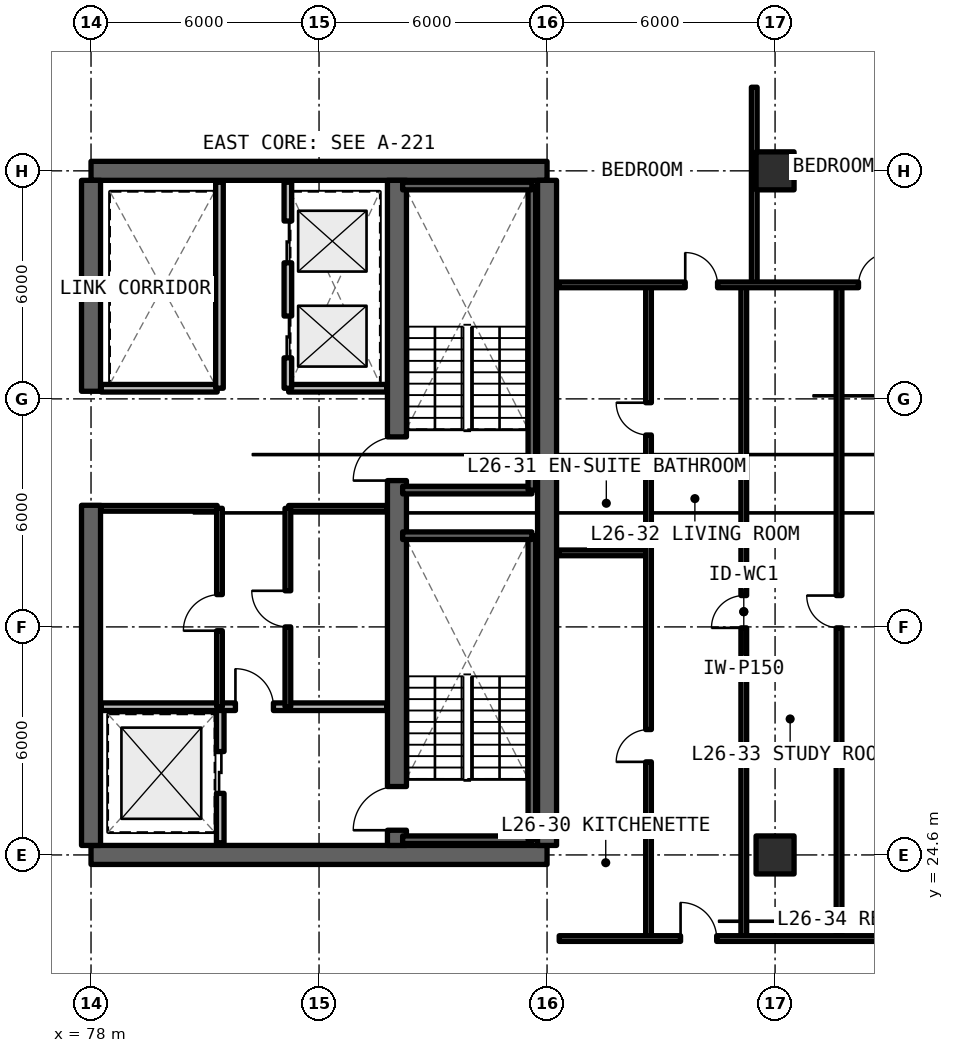
"""IFC4 building model, lengths in metres.
Left out: names, types, materials, properties, quantities, classifications, styles, units other than length and angle.
Written with IfcOpenShell. Run it as: python <this file> out.ifc"""

import sys

from ifc_helpers import new_model, si_unit, direction, frame, frame_2d, origin, origin_2d, place, context, subcontext, project, spatial, rectangle, extrude, element, fill, save


model = new_model("IFC4")
c1 = context("Model", 3, precision=1e-05, world=origin(), true_north=direction((0.0, 1.0)))
c2 = subcontext(c1, "Body", "Model", "MODEL_VIEW")
j1 = project(units=[si_unit("LENGTHUNIT", "METRE"), si_unit("PLANEANGLEUNIT", "RADIAN")], contexts=[c1])
p1 = place(None, origin())
s1 = spatial("IfcSite", under=j1, at=p1, CompositionType="ELEMENT")
p2 = place(p1, origin())
s2 = spatial("IfcBuilding", under=s1, at=p2, CompositionType="ELEMENT")
p3 = place(p2, frame((0.0, 0.0, 95.37)))
s3 = spatial("IfcBuildingStorey", under=s2, at=p3, CompositionType="ELEMENT", Elevation=95.37)
for number, where, z_axis, x_axis in (
    (1, (78.0, 24.6, 0.0), (0.0, 0.0, 1.0), (1.0, 0.0, 0.0)),
    (2, (90.0, 42.6, 0.0), (0.0, 0.0, 1.0), (-1.0, 0.0, 0.0)),
):
    element("IfcWall", number, at=place(p3, frame(where, z_axis=z_axis, x_axis=x_axis)), inside=s3, PredefinedType="SHEAR", context=c2, shape_type="SweptSolid", body=[
        extrude(rectangle(XDim=12.0, YDim=0.5, at=frame_2d((6.0, 0.0))), origin(), (0.0, 0.0, 1.0), 3.3),
    ])
p4 = place(p3, frame((90.0, 24.85, 0.0), z_axis=(0.0, 0.0, 1.0), x_axis=(0.0, 1.0, 0.0)))
e3 = element("IfcWall", 3, at=p4, inside=s3, PredefinedType="SHEAR", context=c2, shape_type="SweptSolid", body=[
    extrude(rectangle(XDim=17.5, YDim=0.5, at=frame_2d((8.75, 0.0))), origin(), (0.0, 0.0, 1.0), 3.3),
])
p5 = place(p3, frame((78.0, 24.85, 0.0), z_axis=(0.0, 0.0, 1.0), x_axis=(0.0, 1.0, 0.0)))
e4 = element("IfcWall", 4, at=p5, inside=s3, PredefinedType="SHEAR", context=c2, shape_type="SweptSolid", body=[
    extrude(rectangle(XDim=8.95, YDim=0.5, at=frame_2d((4.475, 0.0))), origin(), (0.0, 0.0, 1.0), 3.3),
])
p6 = place(p3, frame((78.0, 36.8, 0.0), z_axis=(0.0, 0.0, 1.0), x_axis=(0.0, 1.0, 0.0)))
e5 = element("IfcWall", 5, at=p6, inside=s3, PredefinedType="SHEAR", context=c2, shape_type="SweptSolid", body=[
    extrude(rectangle(XDim=5.55, YDim=0.5, at=frame_2d((2.775, 0.0))), origin(), (0.0, 0.0, 1.0), 3.3),
])
p7 = place(p3, frame((86.05, 24.85, 0.0), z_axis=(0.0, 0.0, 1.0), x_axis=(0.0, 1.0, 0.0)))
e6 = element("IfcWall", 6, at=p7, inside=s3, PredefinedType="SHEAR", context=c2, shape_type="SweptSolid", body=[
    extrude(rectangle(XDim=17.5, YDim=0.5, at=frame_2d((8.75, 0.0))), origin(), (0.0, 0.0, 1.0), 3.3),
])
p8 = place(p7, frame((0.4, 0.0, 0.0)))
e7 = element("IfcOpeningElement", 7, at=p8, cuts=e6, PredefinedType="OPENING", context=c2, shape_type="SweptSolid", body=[
    extrude(rectangle(XDim=1.15, YDim=2.15, at=frame_2d((0.575, 1.075))), frame((0.0, 0.26, 0.0), z_axis=(0.0, -1.0, 0.0), x_axis=(1.0, 0.0, 0.0)), (0.0, 0.0, 1.0), 0.52),
])
p9 = place(p7, frame((9.6, 0.0, 0.0)))
e8 = element("IfcOpeningElement", 8, at=p9, cuts=e6, PredefinedType="OPENING", context=c2, shape_type="SweptSolid", body=[
    extrude(rectangle(XDim=1.15, YDim=2.15, at=frame_2d((0.575, 1.075))), frame((0.0, 0.26, 0.0), z_axis=(0.0, -1.0, 0.0), x_axis=(1.0, 0.0, 0.0)), (0.0, 0.0, 1.0), 0.52),
])
for number, where, z_axis, x_axis in (
    (9, (96.0, 24.6, 0.0), (0.0, 0.0, 1.0), (1.0, 0.0, 0.0)),
    (10, (96.0, 42.6, 0.0), (0.0, 0.0, 1.0), (1.0, 0.0, 0.0)),
):
    element("IfcColumn", number, at=place(p3, frame(where, z_axis=z_axis, x_axis=x_axis)), inside=s3, PredefinedType="COLUMN", context=c2, shape_type="SweptSolid", body=[
        extrude(rectangle(XDim=1.0, YDim=1.0, at=origin_2d()), origin(), (0.0, 0.0, 1.0), 3.3),
    ])
p10 = place(p3, frame((81.4, 24.92, 0.0), z_axis=(0.0, 0.0, 1.0), x_axis=(0.0, 1.0, 0.0)))
e11 = element("IfcWall", 11, at=p10, inside=s3, PredefinedType="SOLIDWALL", context=c2, shape_type="SweptSolid", body=[
    extrude(rectangle(XDim=3.58, YDim=0.2, at=frame_2d((1.79, 0.0))), origin(), (0.0, 0.0, 1.0), 2.35),
])
p11 = place(p10, frame((1.3, 0.0, 0.0)))
e12 = element("IfcOpeningElement", 12, at=p11, cuts=e11, PredefinedType="OPENING", context=c2, shape_type="SweptSolid", body=[
    extrude(rectangle(XDim=1.1, YDim=2.2, at=frame_2d((0.55, 1.1))), frame((0.0, 0.11, 0.0), z_axis=(0.0, -1.0, 0.0), x_axis=(1.0, 0.0, 0.0)), (0.0, 0.0, 1.0), 0.22),
])
p12 = place(p3, frame((78.27, 28.5, 0.0), z_axis=(0.0, 0.0, 1.0), x_axis=(1.0, 0.0, 0.0)))
e13 = element("IfcWall", 13, at=p12, inside=s3, PredefinedType="SOLIDWALL", context=c2, shape_type="SweptSolid", body=[
    extrude(rectangle(XDim=7.51, YDim=0.2, at=frame_2d((3.755, 0.0))), origin(), (0.0, 0.0, 1.0), 2.35),
])
p13 = place(p12, frame((3.53, 0.0, 0.0)))
e14 = element("IfcOpeningElement", 14, at=p13, cuts=e13, PredefinedType="OPENING", context=c2, shape_type="SweptSolid", body=[
    extrude(rectangle(XDim=1.0, YDim=2.15, at=frame_2d((0.5, 1.075))), frame((0.0, 0.11, 0.0), z_axis=(0.0, -1.0, 0.0), x_axis=(1.0, 0.0, 0.0)), (0.0, 0.0, 1.0), 0.22),
])
p14 = place(p3, frame((83.2, 33.72, 0.0), z_axis=(0.0, 0.0, 1.0), x_axis=(1.0, 0.0, 0.0)))
e15 = element("IfcWall", 15, at=p14, inside=s3, PredefinedType="SOLIDWALL", context=c2, shape_type="SweptSolid", body=[
    extrude(rectangle(XDim=2.58, YDim=0.15, at=frame_2d((1.29, 0.0))), origin(), (0.0, 0.0, 1.0), 2.35),
])
p15 = place(p3, frame((83.18, 28.5, 0.0), z_axis=(0.0, 0.0, 1.0), x_axis=(0.0, 1.0, 0.0)))
e16 = element("IfcWall", 16, at=p15, inside=s3, PredefinedType="SOLIDWALL", context=c2, shape_type="SweptSolid", body=[
    extrude(rectangle(XDim=5.22, YDim=0.15, at=frame_2d((2.61, 0.0))), origin(), (0.0, 0.0, 1.0), 2.35),
])
p16 = place(p15, frame((2.1, 0.0, 0.0)))
e17 = element("IfcOpeningElement", 17, at=p16, cuts=e16, PredefinedType="OPENING", context=c2, shape_type="SweptSolid", body=[
    extrude(rectangle(XDim=0.95, YDim=2.15, at=frame_2d((0.475, 1.075))), frame((0.0, 0.085, 0.0), z_axis=(0.0, -1.0, 0.0), x_axis=(1.0, 0.0, 0.0)), (0.0, 0.0, 1.0), 0.17),
])
p17 = place(p3, frame((78.27, 33.72, 0.0), z_axis=(0.0, 0.0, 1.0), x_axis=(1.0, 0.0, 0.0)))
e18 = element("IfcWall", 18, at=p17, inside=s3, PredefinedType="SOLIDWALL", context=c2, shape_type="SweptSolid", body=[
    extrude(rectangle(XDim=3.05, YDim=0.15, at=frame_2d((1.525, 0.0))), origin(), (0.0, 0.0, 1.0), 2.35),
])
p18 = place(p3, frame((81.38, 28.5, 0.0), z_axis=(0.0, 0.0, 1.0), x_axis=(0.0, 1.0, 0.0)))
e19 = element("IfcWall", 19, at=p18, inside=s3, PredefinedType="SOLIDWALL", context=c2, shape_type="SweptSolid", body=[
    extrude(rectangle(XDim=5.22, YDim=0.15, at=frame_2d((2.61, 0.0))), origin(), (0.0, 0.0, 1.0), 2.35),
])
p19 = place(p18, frame((2.0, 0.0, 0.0)))
e20 = element("IfcOpeningElement", 20, at=p19, cuts=e19, PredefinedType="OPENING", context=c2, shape_type="SweptSolid", body=[
    extrude(rectangle(XDim=0.95, YDim=2.15, at=frame_2d((0.475, 1.075))), frame((0.0, 0.085, 0.0), z_axis=(0.0, -1.0, 0.0), x_axis=(1.0, 0.0, 0.0)), (0.0, 0.0, 1.0), 0.17),
])
p20 = place(p3, frame((83.2, 36.88, 0.0), z_axis=(0.0, 0.0, 1.0), x_axis=(1.0, 0.0, 0.0)))
e21 = element("IfcWall", 21, at=p20, inside=s3, PredefinedType="SOLIDWALL", context=c2, shape_type="SweptSolid", body=[
    extrude(rectangle(XDim=2.58, YDim=0.2, at=frame_2d((1.29, 0.0))), origin(), (0.0, 0.0, 1.0), 2.35),
])
p21 = place(p3, frame((83.18, 36.88, 0.0), z_axis=(0.0, 0.0, 1.0), x_axis=(0.0, 1.0, 0.0)))
e22 = element("IfcWall", 22, at=p21, inside=s3, PredefinedType="SOLIDWALL", context=c2, shape_type="SweptSolid", body=[
    extrude(rectangle(XDim=5.42, YDim=0.2, at=frame_2d((2.71, 0.0))), origin(), (0.0, 0.0, 1.0), 2.35),
])
p22 = place(p21, frame((0.8, 0.0, 0.0)))
e23 = element("IfcOpeningElement", 23, at=p22, cuts=e22, PredefinedType="OPENING", context=c2, shape_type="SweptSolid", body=[
    extrude(rectangle(XDim=1.1, YDim=2.2, at=frame_2d((0.55, 1.1))), frame((0.0, 0.11, 0.0), z_axis=(0.0, -1.0, 0.0), x_axis=(1.0, 0.0, 0.0)), (0.0, 0.0, 1.0), 0.22),
])
p23 = place(p21, frame((3.3, 0.0, 0.0)))
e24 = element("IfcOpeningElement", 24, at=p23, cuts=e22, PredefinedType="OPENING", context=c2, shape_type="SweptSolid", body=[
    extrude(rectangle(XDim=1.1, YDim=2.2, at=frame_2d((0.55, 1.1))), frame((0.0, 0.11, 0.0), z_axis=(0.0, -1.0, 0.0), x_axis=(1.0, 0.0, 0.0)), (0.0, 0.0, 1.0), 0.22),
])
p24 = place(p3, frame((78.27, 36.88, 0.0), z_axis=(0.0, 0.0, 1.0), x_axis=(1.0, 0.0, 0.0)))
e25 = element("IfcWall", 25, at=p24, inside=s3, PredefinedType="SOLIDWALL", context=c2, shape_type="SweptSolid", body=[
    extrude(rectangle(XDim=3.05, YDim=0.2, at=frame_2d((1.525, 0.0))), origin(), (0.0, 0.0, 1.0), 2.35),
])
p25 = place(p3, frame((81.38, 36.88, 0.0), z_axis=(0.0, 0.0, 1.0), x_axis=(0.0, 1.0, 0.0)))
e26 = element("IfcWall", 26, at=p25, inside=s3, PredefinedType="SOLIDWALL", context=c2, shape_type="SweptSolid", body=[
    extrude(rectangle(XDim=5.42, YDim=0.2, at=frame_2d((2.71, 0.0))), origin(), (0.0, 0.0, 1.0), 2.35),
])
p26 = place(p3, frame((95.177, 22.4, 0.0), z_axis=(0.0, 0.0, 1.0), x_axis=(0.0, 1.0, 0.0)))
e27 = element("IfcWall", 27, at=p26, inside=s3, PredefinedType="PARTITIONING", context=c2, shape_type="SweptSolid", body=[
    extrude(rectangle(XDim=17.2, YDim=0.15, at=frame_2d((8.6, 0.0))), origin(), (0.0, 0.0, 1.0), 2.35),
])
p27 = place(p26, frame((8.175, 0.0, 0.0)))
e28 = element("IfcOpeningElement", 28, at=p27, cuts=e27, PredefinedType="OPENING", context=c2, shape_type="SweptSolid", body=[
    extrude(rectangle(XDim=0.85, YDim=2.1, at=frame_2d((0.425, 1.05))), frame((0.0, 0.085, 0.0), z_axis=(0.0, -1.0, 0.0), x_axis=(1.0, 0.0, 0.0)), (0.0, 0.0, 1.0), 0.17),
])
p28 = place(p3, frame((97.683, 22.4, 0.0), z_axis=(0.0, 0.0, 1.0), x_axis=(0.0, 1.0, 0.0)))
e29 = element("IfcWall", 29, at=p28, inside=s3, PredefinedType="PARTITIONING", context=c2, shape_type="SweptSolid", body=[
    extrude(rectangle(XDim=17.2, YDim=0.15, at=frame_2d((8.6, 0.0))), origin(), (0.0, 0.0, 1.0), 2.35),
])
p29 = place(p28, frame((8.175, 0.0, 0.0)))
e30 = element("IfcOpeningElement", 30, at=p29, cuts=e29, PredefinedType="OPENING", context=c2, shape_type="SweptSolid", body=[
    extrude(rectangle(XDim=0.85, YDim=2.1, at=frame_2d((0.425, 1.05))), frame((0.0, 0.085, 0.0), z_axis=(0.0, -1.0, 0.0), x_axis=(1.0, 0.0, 0.0)), (0.0, 0.0, 1.0), 0.17),
])
p30 = place(p3, frame((90.32, 32.548, 0.0), z_axis=(0.0, 0.0, 1.0), x_axis=(1.0, 0.0, 0.0)))
e31 = element("IfcWall", 31, at=p30, inside=s3, PredefinedType="PARTITIONING", context=c2, shape_type="SweptSolid", body=[
    extrude(rectangle(XDim=2.35, YDim=0.15, at=frame_2d((1.175, 0.0))), origin(), (0.0, 0.0, 1.0), 2.35),
])
p31 = place(p3, frame((92.67, 22.4, 0.0), z_axis=(0.0, 0.0, 1.0), x_axis=(0.0, 1.0, 0.0)))
e32 = element("IfcWall", 32, at=p31, inside=s3, PredefinedType="PARTITIONING", context=c2, shape_type="SweptSolid", body=[
    extrude(rectangle(XDim=17.2, YDim=0.15, at=frame_2d((8.6, 0.0))), origin(), (0.0, 0.0, 1.0), 2.35),
])
p32 = place(p31, frame((4.649, 0.0, 0.0)))
e33 = element("IfcOpeningElement", 33, at=p32, cuts=e32, PredefinedType="OPENING", context=c2, shape_type="SweptSolid", body=[
    extrude(rectangle(XDim=0.85, YDim=2.1, at=frame_2d((0.425, 1.05))), frame((0.0, 0.085, 0.0), z_axis=(0.0, -1.0, 0.0), x_axis=(1.0, 0.0, 0.0)), (0.0, 0.0, 1.0), 0.17),
])
p33 = place(p31, frame((13.249, 0.0, 0.0)))
e34 = element("IfcOpeningElement", 34, at=p33, cuts=e32, PredefinedType="OPENING", context=c2, shape_type="SweptSolid", body=[
    extrude(rectangle(XDim=0.85, YDim=2.1, at=frame_2d((0.425, 1.05))), frame((0.0, 0.085, 0.0), z_axis=(0.0, -1.0, 0.0), x_axis=(1.0, 0.0, 0.0)), (0.0, 0.0, 1.0), 0.17),
])
p34 = place(p3, frame((95.452, 39.6, 0.0), z_axis=(0.0, 0.0, 1.0), x_axis=(0.0, 1.0, 0.0)))
e35 = element("IfcWall", 35, at=p34, inside=s3, PredefinedType="PARTITIONING", context=c2, shape_type="SweptSolid", body=[
    extrude(rectangle(XDim=5.2, YDim=0.15, at=frame_2d((2.6, 0.0))), origin(), (0.0, 0.0, 1.0), 2.35),
])
p35 = place(p3, frame((90.32, 39.6, 0.0), z_axis=(0.0, 0.0, 1.0), x_axis=(1.0, 0.0, 0.0)))
e36 = element("IfcWall", 36, at=p35, inside=s3, PredefinedType="PARTITIONING", context=c2, shape_type="SweptSolid", body=[
    extrude(rectangle(XDim=9.87, YDim=0.15, at=frame_2d((4.935, 0.0))), origin(), (0.0, 0.0, 1.0), 2.35),
])
p36 = place(p35, frame((3.316, 0.0, 0.0)))
e37 = element("IfcOpeningElement", 37, at=p36, cuts=e36, PredefinedType="OPENING", context=c2, shape_type="SweptSolid", body=[
    extrude(rectangle(XDim=0.85, YDim=2.1, at=frame_2d((0.425, 1.05))), frame((0.0, 0.085, 0.0), z_axis=(0.0, -1.0, 0.0), x_axis=(1.0, 0.0, 0.0)), (0.0, 0.0, 1.0), 0.17),
])
p37 = place(p35, frame((7.876, 0.0, 0.0)))
e38 = element("IfcOpeningElement", 38, at=p37, cuts=e36, PredefinedType="OPENING", context=c2, shape_type="SweptSolid", body=[
    extrude(rectangle(XDim=0.85, YDim=2.1, at=frame_2d((0.425, 1.05))), frame((0.0, 0.085, 0.0), z_axis=(0.0, -1.0, 0.0), x_axis=(1.0, 0.0, 0.0)), (0.0, 0.0, 1.0), 0.17),
])
p38 = place(p3, frame((90.32, 22.4, 0.0), z_axis=(0.0, 0.0, 1.0), x_axis=(1.0, 0.0, 0.0)))
e39 = element("IfcWall", 39, at=p38, inside=s3, PredefinedType="SOLIDWALL", context=c2, shape_type="SweptSolid", body=[
    extrude(rectangle(XDim=9.87, YDim=0.15, at=frame_2d((4.935, 0.0))), origin(), (0.0, 0.0, 1.0), 2.35),
])
p39 = place(p38, frame((3.193, 0.0, 0.0)))
e40 = element("IfcOpeningElement", 40, at=p39, cuts=e39, PredefinedType="OPENING", context=c2, shape_type="SweptSolid", body=[
    extrude(rectangle(XDim=0.95, YDim=2.15, at=frame_2d((0.475, 1.075))), frame((0.0, 0.085, 0.0), z_axis=(0.0, -1.0, 0.0), x_axis=(1.0, 0.0, 0.0)), (0.0, 0.0, 1.0), 0.17),
])
p40 = place(p3, frame((86.2, 25.0, 0.0), z_axis=(0.0, 0.0, 1.0), x_axis=(1.0, 0.0, 0.0)))
e41 = element("IfcWall", 41, at=p40, inside=s3, PredefinedType="SOLIDWALL", context=c2, shape_type="SweptSolid", body=[
    extrude(rectangle(XDim=3.4, YDim=0.2, at=frame_2d((1.7, 0.0))), origin(), (0.0, 0.0, 1.0), 3.3),
])
p41 = place(p3, frame((89.6, 25.0, 0.0), z_axis=(0.0, 0.0, 1.0), x_axis=(0.0, 1.0, 0.0)))
e42 = element("IfcWall", 42, at=p41, inside=s3, PredefinedType="SOLIDWALL", context=c2, shape_type="SweptSolid", body=[
    extrude(rectangle(XDim=8.0, YDim=0.2, at=frame_2d((4.0, 0.0))), origin(), (0.0, 0.0, 1.0), 3.3),
])
for number, where, z_axis, x_axis in (
    (43, (89.6, 33.0, 0.0), (0.0, 0.0, 1.0), (-1.0, 0.0, 0.0)),
    (44, (86.2, 34.2, 0.0), (0.0, 0.0, 1.0), (1.0, 0.0, 0.0)),
):
    element("IfcWall", number, at=place(p3, frame(where, z_axis=z_axis, x_axis=x_axis)), inside=s3, PredefinedType="SOLIDWALL", context=c2, shape_type="SweptSolid", body=[
        extrude(rectangle(XDim=3.4, YDim=0.2, at=frame_2d((1.7, 0.0))), origin(), (0.0, 0.0, 1.0), 3.3),
    ])
p42 = place(p3, frame((89.6, 34.2, 0.0), z_axis=(0.0, 0.0, 1.0), x_axis=(0.0, 1.0, 0.0)))
e45 = element("IfcWall", 45, at=p42, inside=s3, PredefinedType="SOLIDWALL", context=c2, shape_type="SweptSolid", body=[
    extrude(rectangle(XDim=8.0, YDim=0.2, at=frame_2d((4.0, 0.0))), origin(), (0.0, 0.0, 1.0), 3.3),
])
p43 = place(p3, frame((89.6, 42.2, 0.0), z_axis=(0.0, 0.0, 1.0), x_axis=(-1.0, 0.0, 0.0)))
e46 = element("IfcWall", 46, at=p43, inside=s3, PredefinedType="SOLIDWALL", context=c2, shape_type="SweptSolid", body=[
    extrude(rectangle(XDim=3.4, YDim=0.2, at=frame_2d((1.7, 0.0))), origin(), (0.0, 0.0, 1.0), 3.3),
])
p44 = place(p11, origin())
e47 = element("IfcDoor", 47, at=p44, inside=s3, OperationType="SLIDING_TO_LEFT", PredefinedType="DOOR", context=c2, shape_type="SweptSolid", body=[
    extrude(rectangle(XDim=1.1, YDim=2.2, at=frame_2d((0.55, 1.1))), frame((0.0, 0.025, 0.0), z_axis=(0.0, -1.0, 0.0), x_axis=(1.0, 0.0, 0.0)), (0.0, 0.0, 1.0), 0.05),
])
fill(e12, e47)
p45 = place(p13, origin())
e48 = element("IfcDoor", 48, at=p45, inside=s3, OperationType="SINGLE_SWING_LEFT", PredefinedType="DOOR", context=c2, shape_type="SweptSolid", body=[
    extrude(rectangle(XDim=1.0, YDim=2.15, at=frame_2d((0.5, 1.075))), frame((0.0, 0.025, 0.0), z_axis=(0.0, -1.0, 0.0), x_axis=(1.0, 0.0, 0.0)), (0.0, 0.0, 1.0), 0.05),
])
fill(e14, e48)
p46 = place(p16, origin())
e49 = element("IfcDoor", 49, at=p46, inside=s3, OperationType="SINGLE_SWING_RIGHT", PredefinedType="DOOR", context=c2, shape_type="SweptSolid", body=[
    extrude(rectangle(XDim=0.95, YDim=2.15, at=frame_2d((0.475, 1.075))), frame((0.0, 0.025, 0.0), z_axis=(0.0, -1.0, 0.0), x_axis=(1.0, 0.0, 0.0)), (0.0, 0.0, 1.0), 0.05),
])
fill(e17, e49)
p47 = place(p19, origin())
e50 = element("IfcDoor", 50, at=p47, inside=s3, OperationType="SINGLE_SWING_LEFT", PredefinedType="DOOR", context=c2, shape_type="SweptSolid", body=[
    extrude(rectangle(XDim=0.95, YDim=2.15, at=frame_2d((0.475, 1.075))), frame((0.0, 0.025, 0.0), z_axis=(0.0, -1.0, 0.0), x_axis=(1.0, 0.0, 0.0)), (0.0, 0.0, 1.0), 0.05),
])
fill(e20, e50)
p48 = place(p22, origin())
e51 = element("IfcDoor", 51, at=p48, inside=s3, OperationType="SLIDING_TO_LEFT", PredefinedType="DOOR", context=c2, shape_type="SweptSolid", body=[
    extrude(rectangle(XDim=1.1, YDim=2.2, at=frame_2d((0.55, 1.1))), frame((0.0, 0.025, 0.0), z_axis=(0.0, -1.0, 0.0), x_axis=(1.0, 0.0, 0.0)), (0.0, 0.0, 1.0), 0.05),
])
fill(e23, e51)
p49 = place(p23, origin())
e52 = element("IfcDoor", 52, at=p49, inside=s3, OperationType="SLIDING_TO_RIGHT", PredefinedType="DOOR", context=c2, shape_type="SweptSolid", body=[
    extrude(rectangle(XDim=1.1, YDim=2.2, at=frame_2d((0.55, 1.1))), frame((0.0, 0.025, 0.0), z_axis=(0.0, -1.0, 0.0), x_axis=(1.0, 0.0, 0.0)), (0.0, 0.0, 1.0), 0.05),
])
fill(e24, e52)
p50 = place(p27, origin())
e53 = element("IfcDoor", 53, at=p50, inside=s3, OperationType="SINGLE_SWING_LEFT", PredefinedType="DOOR", context=c2, shape_type="SweptSolid", body=[
    extrude(rectangle(XDim=0.85, YDim=2.1, at=frame_2d((0.425, 1.05))), frame((0.0, 0.025, 0.0), z_axis=(0.0, -1.0, 0.0), x_axis=(1.0, 0.0, 0.0)), (0.0, 0.0, 1.0), 0.05),
])
fill(e28, e53)
p51 = place(p29, origin())
e54 = element("IfcDoor", 54, at=p51, inside=s3, OperationType="SINGLE_SWING_RIGHT", PredefinedType="DOOR", context=c2, shape_type="SweptSolid", body=[
    extrude(rectangle(XDim=0.85, YDim=2.1, at=frame_2d((0.425, 1.05))), frame((0.0, 0.025, 0.0), z_axis=(0.0, -1.0, 0.0), x_axis=(1.0, 0.0, 0.0)), (0.0, 0.0, 1.0), 0.05),
])
fill(e30, e54)
p52 = place(p32, origin())
e55 = element("IfcDoor", 55, at=p52, inside=s3, OperationType="SINGLE_SWING_LEFT", PredefinedType="DOOR", context=c2, shape_type="SweptSolid", body=[
    extrude(rectangle(XDim=0.85, YDim=2.1, at=frame_2d((0.425, 1.05))), frame((0.0, 0.025, 0.0), z_axis=(0.0, -1.0, 0.0), x_axis=(1.0, 0.0, 0.0)), (0.0, 0.0, 1.0), 0.05),
])
fill(e33, e55)
p53 = place(p33, origin())
e56 = element("IfcDoor", 56, at=p53, inside=s3, OperationType="SINGLE_SWING_RIGHT", PredefinedType="DOOR", context=c2, shape_type="SweptSolid", body=[
    extrude(rectangle(XDim=0.85, YDim=2.1, at=frame_2d((0.425, 1.05))), frame((0.0, 0.025, 0.0), z_axis=(0.0, -1.0, 0.0), x_axis=(1.0, 0.0, 0.0)), (0.0, 0.0, 1.0), 0.05),
])
fill(e34, e56)
p54 = place(p36, origin())
e57 = element("IfcDoor", 57, at=p54, inside=s3, OperationType="SINGLE_SWING_LEFT", PredefinedType="DOOR", context=c2, shape_type="SweptSolid", body=[
    extrude(rectangle(XDim=0.85, YDim=2.1, at=frame_2d((0.425, 1.05))), frame((0.0, 0.025, 0.0), z_axis=(0.0, -1.0, 0.0), x_axis=(1.0, 0.0, 0.0)), (0.0, 0.0, 1.0), 0.05),
])
fill(e37, e57)
p55 = place(p37, origin())
e58 = element("IfcDoor", 58, at=p55, inside=s3, OperationType="SINGLE_SWING_RIGHT", PredefinedType="DOOR", context=c2, shape_type="SweptSolid", body=[
    extrude(rectangle(XDim=0.85, YDim=2.1, at=frame_2d((0.425, 1.05))), frame((0.0, 0.025, 0.0), z_axis=(0.0, -1.0, 0.0), x_axis=(1.0, 0.0, 0.0)), (0.0, 0.0, 1.0), 0.05),
])
fill(e38, e58)
p56 = place(p39, origin())
e59 = element("IfcDoor", 59, at=p56, inside=s3, OperationType="SINGLE_SWING_LEFT", PredefinedType="DOOR", context=c2, shape_type="SweptSolid", body=[
    extrude(rectangle(XDim=0.95, YDim=2.15, at=frame_2d((0.475, 1.075))), frame((0.0, 0.025, 0.0), z_axis=(0.0, -1.0, 0.0), x_axis=(1.0, 0.0, 0.0)), (0.0, 0.0, 1.0), 0.05),
])
fill(e40, e59)
p57 = place(p8, origin())
e60 = element("IfcDoor", 60, at=p57, inside=s3, OperationType="SINGLE_SWING_LEFT", PredefinedType="DOOR", context=c2, shape_type="SweptSolid", body=[
    extrude(rectangle(XDim=1.15, YDim=2.15, at=frame_2d((0.575, 1.075))), frame((0.0, 0.025, 0.0), z_axis=(0.0, -1.0, 0.0), x_axis=(1.0, 0.0, 0.0)), (0.0, 0.0, 1.0), 0.05),
])
fill(e7, e60)
p58 = place(p9, origin())
e61 = element("IfcDoor", 61, at=p58, inside=s3, OperationType="SINGLE_SWING_RIGHT", PredefinedType="DOOR", context=c2, shape_type="SweptSolid", body=[
    extrude(rectangle(XDim=1.15, YDim=2.15, at=frame_2d((0.575, 1.075))), frame((0.0, 0.025, 0.0), z_axis=(0.0, -1.0, 0.0), x_axis=(1.0, 0.0, 0.0)), (0.0, 0.0, 1.0), 0.05),
])
fill(e8, e61)
save(model, sys.argv[1])
